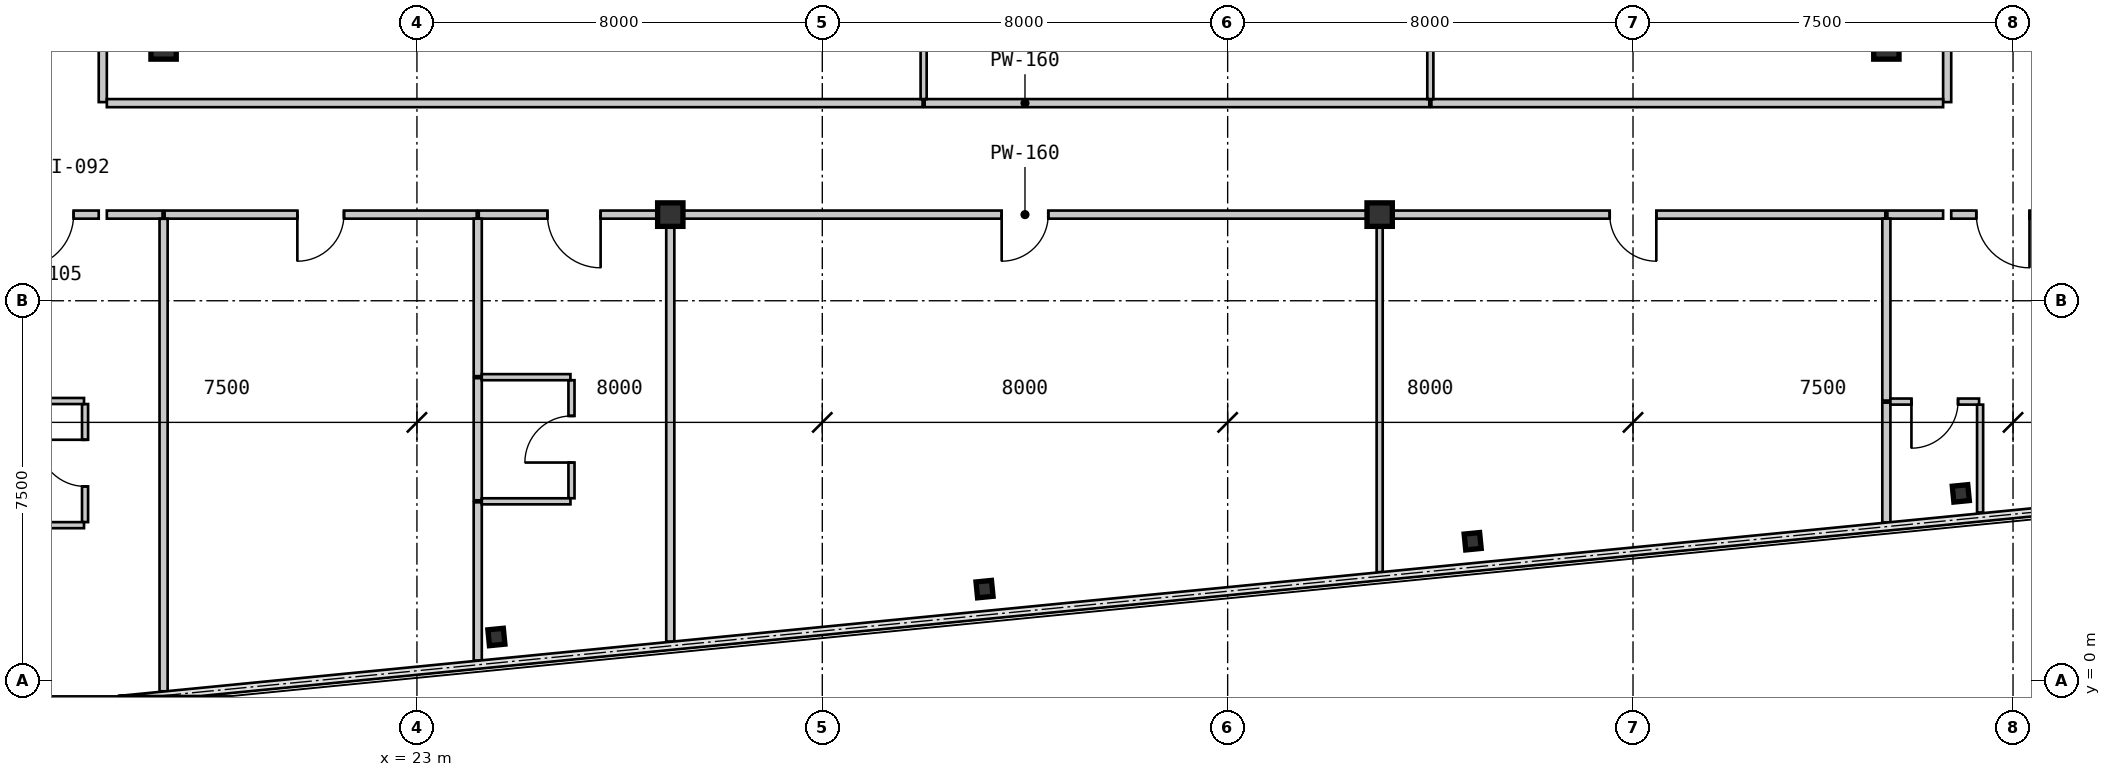
"""IFC4 building model, lengths in metres.
Left out: names, types, materials, properties, quantities, classifications, styles, units other than length and angle.
Written with IfcOpenShell. Run it as: python <this file> out.ifc"""

import sys

from ifc_helpers import new_model, si_unit, direction, frame, frame_2d, origin, origin_2d, place, context, subcontext, project, spatial, rectangle, i_section, extrude, source, transform, mapped, element, fill, save


model = new_model("IFC4")
c1 = context("Model", 3, precision=1e-05, world=origin(), true_north=direction((0.0, 1.0)))
c2 = subcontext(c1, "Body", "Model", "MODEL_VIEW")
j1 = project(units=[si_unit("LENGTHUNIT", "METRE"), si_unit("PLANEANGLEUNIT", "RADIAN")], contexts=[c1])
p1 = place(None, origin())
s1 = spatial("IfcSite", under=j1, at=p1, CompositionType="ELEMENT")
p2 = place(p1, origin())
s2 = spatial("IfcBuilding", under=s1, at=p2, CompositionType="ELEMENT")
p3 = place(p2, frame((0.0, 0.0, 80.85)))
s3 = spatial("IfcBuildingStorey", under=s2, at=p3, CompositionType="ELEMENT", Elevation=80.85)
m1 = source(origin(), c2, "Body", "SweptSolid", [
    extrude(i_section(OverallWidth=0.5, OverallDepth=0.464, WebThickness=0.022, FlangeThickness=0.034, at=origin_2d()), origin(), (0.0, 0.0, 1.0), 3.15),
])
for number, where, z_axis, x_axis in (
    (1, (28.0, 9.2, 0.0), (0.0, 0.0, 1.0), (1.0, 0.0, 0.0)),
    (2, (42.0, 9.2, 0.0), (0.0, 0.0, 1.0), (1.0, 0.0, 0.0)),
    (3, (18.0, 12.5, 0.0), (0.0, 0.0, 1.0), (1.0, 0.0, 0.0)),
    (4, (52.0, 12.5, 0.0), (0.0, 0.0, 1.0), (1.0, 0.0, 0.0)),
):
    element("IfcColumn", number, at=place(p3, frame(where, z_axis=z_axis, x_axis=x_axis)), inside=s3, PredefinedType="COLUMN", context=c2, shape_type="MappedRepresentation", body=[
        mapped(m1, transform((0.0, 0.0, 0.0), scale=1.0)),
    ])
m2 = source(origin(), c2, "Body", "SweptSolid", [
    extrude(i_section(OverallWidth=0.307, OverallDepth=0.315, WebThickness=0.012, FlangeThickness=0.019, at=origin_2d()), origin(), (0.0, 0.0, 1.0), 3.15),
])
for number, where, z_axis, x_axis in (
    (5, (24.568, 0.865, 0.0), (0.0, 0.0, 1.0), (0.995, 0.098, 0.0)),
    (6, (34.202, 1.809, 0.0), (0.0, 0.0, 1.0), (0.995, 0.098, 0.0)),
    (7, (43.835, 2.754, 0.0), (0.0, 0.0, 1.0), (0.995, 0.098, 0.0)),
    (8, (53.469, 3.698, 0.0), (0.0, 0.0, 1.0), (0.995, 0.098, 0.0)),
):
    element("IfcColumn", number, at=place(p3, frame(where, z_axis=z_axis, x_axis=x_axis)), inside=s3, PredefinedType="COLUMN", context=c2, shape_type="MappedRepresentation", body=[
        mapped(m2, transform((0.0, 0.0, 0.0), scale=1.0)),
    ])
m3 = source(origin(), c2, "Body", "SweptSolid", [
    extrude(rectangle(XDim=10.3, YDim=0.16, at=frame_2d((5.15, 0.0))), origin(), (0.0, 0.0, 1.0), 2.93),
])
p4 = place(p3, frame((16.8, 21.72, 0.0), z_axis=(0.0, 0.0, 1.0), x_axis=(0.0, -1.0, 0.0)))
e9 = element("IfcWall", 9, at=p4, inside=s3, PredefinedType="PARTITIONING", context=c2, shape_type="MappedRepresentation", body=[
    mapped(m3, transform((0.0, 0.0, 0.0), scale=1.0)),
])
p5 = place(p3, frame((53.2, 11.42, 0.0), z_axis=(0.0, 0.0, 1.0), x_axis=(0.0, 1.0, 0.0)))
e10 = element("IfcWall", 10, at=p5, inside=s3, PredefinedType="PARTITIONING", context=c2, shape_type="MappedRepresentation", body=[
    mapped(m3, transform((0.0, 0.0, 0.0), scale=1.0)),
])
m4 = source(origin(), c2, "Body", "SweptSolid", [
    extrude(rectangle(XDim=1.05, YDim=2.1, at=frame_2d((0.525, 1.05))), frame((0.0, 0.09, 0.0), z_axis=(0.0, -1.0, 0.0), x_axis=(1.0, 0.0, 0.0)), (0.0, 0.0, 1.0), 0.18),
])
p6 = place(p5, frame((4.655, 0.0, 0.0)))
e11 = element("IfcOpeningElement", 11, at=p6, cuts=e10, PredefinedType="OPENING", context=c2, shape_type="MappedRepresentation", body=[
    mapped(m4, transform((0.0, 0.0, 0.0), scale=1.0)),
])
m5 = source(origin(), c2, "Body", "SweptSolid", [
    extrude(rectangle(XDim=2.04, YDim=0.16, at=frame_2d((1.02, 0.0))), origin(), (0.0, 0.0, 1.0), 2.93),
])
p7 = place(p3, frame((16.72, 9.2, 0.0), z_axis=(0.0, 0.0, 1.0), x_axis=(-1.0, 0.0, 0.0)))
e12 = element("IfcWall", 12, at=p7, inside=s3, PredefinedType="PARTITIONING", context=c2, shape_type="MappedRepresentation", body=[
    mapped(m5, transform((0.0, 0.0, 0.0), scale=1.0)),
])
p8 = place(p7, frame((0.495, 0.0, 0.0)))
e13 = element("IfcOpeningElement", 13, at=p8, cuts=e12, PredefinedType="OPENING", context=c2, shape_type="MappedRepresentation", body=[
    mapped(m4, transform((0.0, 0.0, 0.0), scale=1.0)),
])
p9 = place(p3, frame((55.32, 9.2, 0.0), z_axis=(0.0, 0.0, 1.0), x_axis=(-1.0, 0.0, 0.0)))
e14 = element("IfcWall", 14, at=p9, inside=s3, PredefinedType="PARTITIONING", context=c2, shape_type="MappedRepresentation", body=[
    mapped(m5, transform((0.0, 0.0, 0.0), scale=1.0)),
])
p10 = place(p9, frame((0.495, 0.0, 0.0)))
e15 = element("IfcOpeningElement", 15, at=p10, cuts=e14, PredefinedType="OPENING", context=c2, shape_type="MappedRepresentation", body=[
    mapped(m4, transform((0.0, 0.0, 0.0), scale=1.0)),
])
m6 = source(origin(), c2, "Body", "SweptSolid", [
    extrude(rectangle(XDim=16.1, YDim=0.16, at=frame_2d((8.05, 0.0))), origin(), (0.0, 0.0, 1.0), 2.93),
])
p11 = place(p3, frame((16.88, 11.4, 0.0), z_axis=(0.0, 0.0, 1.0), x_axis=(1.0, 0.0, 0.0)))
e16 = element("IfcWall", 16, at=p11, inside=s3, PredefinedType="PARTITIONING", context=c2, shape_type="MappedRepresentation", body=[
    mapped(m6, transform((0.0, 0.0, 0.0), scale=1.0)),
])
m7 = source(origin(), c2, "Body", "SweptSolid", [
    extrude(rectangle(XDim=9.959, YDim=0.16, at=frame_2d((4.98, 0.0))), origin(), (0.0, 0.0, 1.0), 2.93),
])
p12 = place(p3, frame((33.02, 11.4, 0.0), z_axis=(0.0, 0.0, 1.0), x_axis=(1.0, 0.0, 0.0)))
e17 = element("IfcWall", 17, at=p12, inside=s3, PredefinedType="PARTITIONING", context=c2, shape_type="MappedRepresentation", body=[
    mapped(m7, transform((0.0, 0.0, 0.0), scale=1.0)),
])
m8 = source(origin(), c2, "Body", "SweptSolid", [
    extrude(rectangle(XDim=10.1, YDim=0.16, at=frame_2d((5.05, 0.0))), origin(), (0.0, 0.0, 1.0), 2.93),
])
p13 = place(p3, frame((43.02, 11.4, 0.0), z_axis=(0.0, 0.0, 1.0), x_axis=(1.0, 0.0, 0.0)))
e18 = element("IfcWall", 18, at=p13, inside=s3, PredefinedType="PARTITIONING", context=c2, shape_type="MappedRepresentation", body=[
    mapped(m8, transform((0.0, 0.0, 0.0), scale=1.0)),
])
m9 = source(origin(), c2, "Body", "SweptSolid", [
    extrude(rectangle(XDim=1.1, YDim=0.16, at=frame_2d((0.55, 0.0))), origin(), (0.0, 0.0, 1.0), 2.93),
])
p14 = place(p3, frame((17.98, 9.2, 0.0), z_axis=(0.0, 0.0, 1.0), x_axis=(-1.0, 0.0, 0.0)))
e19 = element("IfcWall", 19, at=p14, inside=s3, PredefinedType="PARTITIONING", context=c2, shape_type="MappedRepresentation", body=[
    mapped(m9, transform((0.0, 0.0, 0.0), scale=1.0)),
])
m10 = source(origin(), c2, "Body", "SweptSolid", [
    extrude(rectangle(XDim=6.159, YDim=0.16, at=frame_2d((3.08, 0.0))), origin(), (0.0, 0.0, 1.0), 2.93),
])
p15 = place(p3, frame((24.18, 9.2, 0.0), z_axis=(0.0, 0.0, 1.0), x_axis=(-1.0, 0.0, 0.0)))
e20 = element("IfcWall", 20, at=p15, inside=s3, PredefinedType="PARTITIONING", context=c2, shape_type="MappedRepresentation", body=[
    mapped(m10, transform((0.0, 0.0, 0.0), scale=1.0)),
])
m11 = source(origin(), c2, "Body", "SweptSolid", [
    extrude(rectangle(XDim=0.92, YDim=2.1, at=frame_2d((0.46, 1.05))), frame((0.0, 0.09, 0.0), z_axis=(0.0, -1.0, 0.0), x_axis=(1.0, 0.0, 0.0)), (0.0, 0.0, 1.0), 0.18),
])
p16 = place(p15, frame((2.62, 0.0, 0.0)))
e21 = element("IfcOpeningElement", 21, at=p16, cuts=e20, PredefinedType="OPENING", context=c2, shape_type="MappedRepresentation", body=[
    mapped(m11, transform((0.0, 0.0, 0.0), scale=1.0)),
])
m12 = source(origin(), c2, "Body", "SweptSolid", [
    extrude(rectangle(XDim=3.76, YDim=0.16, at=frame_2d((1.88, 0.0))), origin(), (0.0, 0.0, 1.0), 2.93),
])
p17 = place(p3, frame((27.98, 9.2, 0.0), z_axis=(0.0, 0.0, 1.0), x_axis=(-1.0, 0.0, 0.0)))
e22 = element("IfcWall", 22, at=p17, inside=s3, PredefinedType="PARTITIONING", context=c2, shape_type="MappedRepresentation", body=[
    mapped(m12, transform((0.0, 0.0, 0.0), scale=1.0)),
])
p18 = place(p17, frame((1.355, 0.0, 0.0)))
e23 = element("IfcOpeningElement", 23, at=p18, cuts=e22, PredefinedType="OPENING", context=c2, shape_type="MappedRepresentation", body=[
    mapped(m4, transform((0.0, 0.0, 0.0), scale=1.0)),
])
m13 = source(origin(), c2, "Body", "SweptSolid", [
    extrude(rectangle(XDim=13.959, YDim=0.16, at=frame_2d((6.98, 0.0))), origin(), (0.0, 0.0, 1.0), 2.328),
])
p19 = place(p3, frame((41.98, 9.2, 0.0), z_axis=(0.0, 0.0, 1.0), x_axis=(-1.0, 0.0, 0.0)))
e24 = element("IfcWall", 24, at=p19, inside=s3, PredefinedType="PARTITIONING", context=c2, shape_type="MappedRepresentation", body=[
    mapped(m13, transform((0.0, 0.0, 0.0), scale=1.0)),
])
p20 = place(p19, frame((6.52, 0.0, 0.0)))
e25 = element("IfcOpeningElement", 25, at=p20, cuts=e24, PredefinedType="OPENING", context=c2, shape_type="MappedRepresentation", body=[
    mapped(m11, transform((0.0, 0.0, 0.0), scale=1.0)),
])
p21 = place(p3, frame((51.98, 9.2, 0.0), z_axis=(0.0, 0.0, 1.0), x_axis=(-1.0, 0.0, 0.0)))
e26 = element("IfcWall", 26, at=p21, inside=s3, PredefinedType="PARTITIONING", context=c2, shape_type="MappedRepresentation", body=[
    mapped(m7, transform((0.0, 0.0, 0.0), scale=1.0)),
])
p22 = place(p21, frame((4.52, 0.0, 0.0)))
e27 = element("IfcOpeningElement", 27, at=p22, cuts=e26, PredefinedType="OPENING", context=c2, shape_type="MappedRepresentation", body=[
    mapped(m11, transform((0.0, 0.0, 0.0), scale=1.0)),
])
p23 = place(p3, frame((53.12, 9.2, 0.0), z_axis=(0.0, 0.0, 1.0), x_axis=(-1.0, 0.0, 0.0)))
e28 = element("IfcWall", 28, at=p23, inside=s3, PredefinedType="PARTITIONING", context=c2, shape_type="MappedRepresentation", body=[
    mapped(m9, transform((0.0, 0.0, 0.0), scale=1.0)),
])
m14 = source(origin(), c2, "Body", "SweptSolid", [
    extrude(rectangle(XDim=10.24, YDim=0.12, at=frame_2d((5.12, 0.0))), origin(), (0.0, 0.0, 1.0), 2.93),
])
for number, where, z_axis, x_axis in (
    (29, (33.0, 21.72, 0.0), (0.0, 0.0, 1.0), (0.0, -1.0, 0.0)),
    (30, (43.0, 21.72, 0.0), (0.0, 0.0, 1.0), (0.0, -1.0, 0.0)),
):
    element("IfcWall", number, at=place(p3, frame(where, z_axis=z_axis, x_axis=x_axis)), inside=s3, PredefinedType="PARTITIONING", context=c2, shape_type="MappedRepresentation", body=[
        mapped(m14, transform((0.0, 0.0, 0.0), scale=1.0)),
    ])
m15 = source(origin(), c2, "Body", "SweptSolid", [
    extrude(rectangle(XDim=2.33, YDim=0.12, at=frame_2d((1.165, 0.0))), origin(), (0.0, 0.0, 1.0), 2.93),
])
p24 = place(p3, frame((16.45, 3.132, 0.0), z_axis=(0.0, 0.0, 1.0), x_axis=(0.0, 1.0, 0.0)))
e31 = element("IfcWall", 31, at=p24, inside=s3, PredefinedType="PARTITIONING", context=c2, shape_type="MappedRepresentation", body=[
    mapped(m15, transform((0.0, 0.0, 0.0), scale=1.0)),
])
m16 = source(origin(), c2, "Body", "SweptSolid", [
    extrude(rectangle(XDim=0.92, YDim=2.1, at=frame_2d((0.46, 1.05))), frame((0.0, 0.07, 0.0), z_axis=(0.0, -1.0, 0.0), x_axis=(1.0, 0.0, 0.0)), (0.0, 0.0, 1.0), 0.14),
])
p25 = place(p24, frame((0.705, 0.0, 0.0)))
e32 = element("IfcOpeningElement", 32, at=p25, cuts=e31, PredefinedType="OPENING", context=c2, shape_type="MappedRepresentation", body=[
    mapped(m16, transform((0.0, 0.0, 0.0), scale=1.0)),
])
m17 = source(origin(), c2, "Body", "SweptSolid", [
    extrude(rectangle(XDim=1.75, YDim=0.12, at=frame_2d((0.875, 0.0))), origin(), (0.0, 0.0, 1.0), 2.93),
])
for number, where, z_axis, x_axis in (
    (33, (14.68, 3.072, 0.0), (0.0, 0.0, 1.0), (1.0, 0.0, 0.0)),
    (34, (16.43, 5.521, 0.0), (0.0, 0.0, 1.0), (-1.0, 0.0, 0.0)),
):
    element("IfcWall", number, at=place(p3, frame(where, z_axis=z_axis, x_axis=x_axis)), inside=s3, PredefinedType="PARTITIONING", context=c2, shape_type="MappedRepresentation", body=[
        mapped(m17, transform((0.0, 0.0, 0.0), scale=1.0)),
    ])
m18 = source(origin(), c2, "Body", "SweptSolid", [
    extrude(rectangle(XDim=9.325, YDim=0.16, at=frame_2d((4.663, 0.0))), origin(), (0.0, 0.0, 1.0), 2.93),
])
p26 = place(p3, frame((18.0, 9.118, 0.0), z_axis=(0.0, 0.0, 1.0), x_axis=(0.0, -1.0, 0.0)))
e35 = element("IfcWall", 35, at=p26, inside=s3, PredefinedType="PARTITIONING", context=c2, shape_type="MappedRepresentation", body=[
    mapped(m18, transform((0.0, 0.0, 0.0), scale=1.0)),
])
m19 = source(origin(), c2, "Body", "SweptSolid", [
    extrude(rectangle(XDim=3.124, YDim=0.16, at=frame_2d((1.562, 0.0))), origin(), (0.0, 0.0, 1.0), 2.93),
])
p27 = place(p3, frame((24.2, 3.522, 0.0), z_axis=(0.0, 0.0, 1.0), x_axis=(0.0, -1.0, 0.0)))
e36 = element("IfcWall", 36, at=p27, inside=s3, PredefinedType="PARTITIONING", context=c2, shape_type="MappedRepresentation", body=[
    mapped(m19, transform((0.0, 0.0, 0.0), scale=1.0)),
])
m20 = source(origin(), c2, "Body", "SweptSolid", [
    extrude(rectangle(XDim=3.108, YDim=0.16, at=frame_2d((1.554, 0.0))), origin(), (0.0, 0.0, 1.0), 2.93),
])
p28 = place(p3, frame((24.2, 9.12, 0.0), z_axis=(0.0, 0.0, 1.0), x_axis=(0.0, -1.0, 0.0)))
e37 = element("IfcWall", 37, at=p28, inside=s3, PredefinedType="PARTITIONING", context=c2, shape_type="MappedRepresentation", body=[
    mapped(m20, transform((0.0, 0.0, 0.0), scale=1.0)),
])
m21 = source(origin(), c2, "Body", "SweptSolid", [
    extrude(rectangle(XDim=2.41, YDim=0.16, at=frame_2d((1.205, 0.0))), origin(), (0.0, 0.0, 1.0), 2.93),
])
p29 = place(p3, frame((24.2, 5.972, 0.0), z_axis=(0.0, 0.0, 1.0), x_axis=(0.0, -1.0, 0.0)))
e38 = element("IfcWall", 38, at=p29, inside=s3, PredefinedType="PARTITIONING", context=c2, shape_type="MappedRepresentation", body=[
    mapped(m21, transform((0.0, 0.0, 0.0), scale=1.0)),
])
m22 = source(origin(), c2, "Body", "SweptSolid", [
    extrude(rectangle(XDim=2.33, YDim=0.12, at=frame_2d((1.165, 0.0))), origin(), (0.0, 0.0, 1.0), 2.93),
])
p30 = place(p3, frame((26.05, 3.602, 0.0), z_axis=(0.0, 0.0, 1.0), x_axis=(0.0, 1.0, 0.0)))
e39 = element("IfcWall", 39, at=p30, inside=s3, PredefinedType="PARTITIONING", context=c2, shape_type="MappedRepresentation", body=[
    mapped(m22, transform((0.0, 0.0, 0.0), scale=1.0)),
])
p31 = place(p30, frame((0.705, 0.0, 0.0)))
e40 = element("IfcOpeningElement", 40, at=p31, cuts=e39, PredefinedType="OPENING", context=c2, shape_type="MappedRepresentation", body=[
    mapped(m16, transform((0.0, 0.0, 0.0), scale=1.0)),
])
for number, where, z_axis, x_axis in (
    (41, (24.28, 3.542, 0.0), (0.0, 0.0, 1.0), (1.0, 0.0, 0.0)),
    (42, (26.03, 5.992, 0.0), (0.0, 0.0, 1.0), (-1.0, 0.0, 0.0)),
):
    element("IfcWall", number, at=place(p3, frame(where, z_axis=z_axis, x_axis=x_axis)), inside=s3, PredefinedType="PARTITIONING", context=c2, shape_type="MappedRepresentation", body=[
        mapped(m17, transform((0.0, 0.0, 0.0), scale=1.0)),
    ])
m23 = source(origin(), c2, "Body", "SweptSolid", [
    extrude(rectangle(XDim=8.345, YDim=0.16, at=frame_2d((4.172, 0.0))), origin(), (0.0, 0.0, 1.0), 2.93),
])
p32 = place(p3, frame((28.0, 9.118, 0.0), z_axis=(0.0, 0.0, 1.0), x_axis=(0.0, -1.0, 0.0)))
e43 = element("IfcWall", 43, at=p32, inside=s3, PredefinedType="PARTITIONING", context=c2, shape_type="MappedRepresentation", body=[
    mapped(m23, transform((0.0, 0.0, 0.0), scale=1.0)),
])
m24 = source(origin(), c2, "Body", "SweptSolid", [
    extrude(rectangle(XDim=6.976, YDim=0.12, at=frame_2d((3.488, 0.0))), origin(), (0.0, 0.0, 1.0), 2.93),
])
p33 = place(p3, frame((42.0, 9.12, 0.0), z_axis=(0.0, 0.0, 1.0), x_axis=(0.0, -1.0, 0.0)))
e44 = element("IfcWall", 44, at=p33, inside=s3, PredefinedType="PARTITIONING", context=c2, shape_type="MappedRepresentation", body=[
    mapped(m24, transform((0.0, 0.0, 0.0), scale=1.0)),
])
m25 = source(origin(), c2, "Body", "SweptSolid", [
    extrude(rectangle(XDim=3.59, YDim=0.16, at=frame_2d((1.795, 0.0))), origin(), (0.0, 0.0, 1.0), 2.93),
])
p34 = place(p3, frame((52.0, 9.12, 0.0), z_axis=(0.0, 0.0, 1.0), x_axis=(0.0, -1.0, 0.0)))
e45 = element("IfcWall", 45, at=p34, inside=s3, PredefinedType="PARTITIONING", context=c2, shape_type="MappedRepresentation", body=[
    mapped(m25, transform((0.0, 0.0, 0.0), scale=1.0)),
])
m26 = source(origin(), c2, "Body", "SweptSolid", [
    extrude(rectangle(XDim=2.365, YDim=0.16, at=frame_2d((1.183, 0.0))), origin(), (0.0, 0.0, 1.0), 2.93),
])
p35 = place(p3, frame((52.0, 5.49, 0.0), z_axis=(0.0, 0.0, 1.0), x_axis=(0.0, -1.0, 0.0)))
e46 = element("IfcWall", 46, at=p35, inside=s3, PredefinedType="PARTITIONING", context=c2, shape_type="MappedRepresentation", body=[
    mapped(m26, transform((0.0, 0.0, 0.0), scale=1.0)),
])
m27 = source(origin(), c2, "Body", "SweptSolid", [
    extrude(rectangle(XDim=2.128, YDim=0.12, at=frame_2d((1.064, 0.0))), origin(), (0.0, 0.0, 1.0), 2.93),
])
p36 = place(p3, frame((53.85, 3.322, 0.0), z_axis=(0.0, 0.0, 1.0), x_axis=(0.0, 1.0, 0.0)))
e47 = element("IfcWall", 47, at=p36, inside=s3, PredefinedType="PARTITIONING", context=c2, shape_type="MappedRepresentation", body=[
    mapped(m27, transform((0.0, 0.0, 0.0), scale=1.0)),
])
p37 = place(p3, frame((53.83, 5.51, 0.0), z_axis=(0.0, 0.0, 1.0), x_axis=(-1.0, 0.0, 0.0)))
e48 = element("IfcWall", 48, at=p37, inside=s3, PredefinedType="PARTITIONING", context=c2, shape_type="MappedRepresentation", body=[
    mapped(m17, transform((0.0, 0.0, 0.0), scale=1.0)),
])
p38 = place(p37, frame((0.415, 0.0, 0.0)))
e49 = element("IfcOpeningElement", 49, at=p38, cuts=e48, PredefinedType="OPENING", context=c2, shape_type="MappedRepresentation", body=[
    mapped(m16, transform((0.0, 0.0, 0.0), scale=1.0)),
])
m28 = source(origin(), c2, "Body", "SweptSolid", [
    extrude(rectangle(XDim=1.05, YDim=2.1, at=frame_2d((0.525, 1.05))), frame((0.0, 0.025, 0.0), z_axis=(0.0, -1.0, 0.0), x_axis=(1.0, 0.0, 0.0)), (0.0, 0.0, 1.0), 0.05),
])
p39 = place(p8, origin())
e50 = element("IfcDoor", 50, at=p39, inside=s3, OperationType="SINGLE_SWING_RIGHT", PredefinedType="DOOR", context=c2, shape_type="MappedRepresentation", body=[
    mapped(m28, transform((0.0, 0.0, 0.0), scale=1.0)),
])
fill(e13, e50)
p40 = place(p10, origin())
e51 = element("IfcDoor", 51, at=p40, inside=s3, OperationType="SINGLE_SWING_LEFT", PredefinedType="DOOR", context=c2, shape_type="MappedRepresentation", body=[
    mapped(m28, transform((0.0, 0.0, 0.0), scale=1.0)),
])
fill(e15, e51)
m29 = source(origin(), c2, "Body", "SweptSolid", [
    extrude(rectangle(XDim=0.92, YDim=2.1, at=frame_2d((0.46, 1.05))), frame((0.0, 0.025, 0.0), z_axis=(0.0, -1.0, 0.0), x_axis=(1.0, 0.0, 0.0)), (0.0, 0.0, 1.0), 0.05),
])
p41 = place(p16, origin())
e52 = element("IfcDoor", 52, at=p41, inside=s3, OperationType="SINGLE_SWING_RIGHT", PredefinedType="DOOR", context=c2, shape_type="MappedRepresentation", body=[
    mapped(m29, transform((0.0, 0.0, 0.0), scale=1.0)),
])
fill(e21, e52)
p42 = place(p18, origin())
e53 = element("IfcDoor", 53, at=p42, inside=s3, OperationType="SINGLE_SWING_LEFT", PredefinedType="DOOR", context=c2, shape_type="MappedRepresentation", body=[
    mapped(m28, transform((0.0, 0.0, 0.0), scale=1.0)),
])
fill(e23, e53)
p43 = place(p20, origin())
e54 = element("IfcDoor", 54, at=p43, inside=s3, OperationType="SINGLE_SWING_RIGHT", PredefinedType="DOOR", context=c2, shape_type="MappedRepresentation", body=[
    mapped(m29, transform((0.0, 0.0, 0.0), scale=1.0)),
])
fill(e25, e54)
p44 = place(p22, origin())
e55 = element("IfcDoor", 55, at=p44, inside=s3, OperationType="SINGLE_SWING_LEFT", PredefinedType="DOOR", context=c2, shape_type="MappedRepresentation", body=[
    mapped(m29, transform((0.0, 0.0, 0.0), scale=1.0)),
])
fill(e27, e55)
p45 = place(p25, origin())
e56 = element("IfcDoor", 56, at=p45, inside=s3, OperationType="SINGLE_SWING_RIGHT", PredefinedType="DOOR", context=c2, shape_type="MappedRepresentation", body=[
    mapped(m29, transform((0.0, 0.0, 0.0), scale=1.0)),
])
fill(e32, e56)
p46 = place(p31, origin())
e57 = element("IfcDoor", 57, at=p46, inside=s3, OperationType="SINGLE_SWING_LEFT", PredefinedType="DOOR", context=c2, shape_type="MappedRepresentation", body=[
    mapped(m29, transform((0.0, 0.0, 0.0), scale=1.0)),
])
fill(e40, e57)
p47 = place(p38, origin())
e58 = element("IfcDoor", 58, at=p47, inside=s3, OperationType="SINGLE_SWING_RIGHT", PredefinedType="DOOR", context=c2, shape_type="MappedRepresentation", body=[
    mapped(m29, transform((0.0, 0.0, 0.0), scale=1.0)),
])
fill(e49, e58)
save(model, sys.argv[1])
